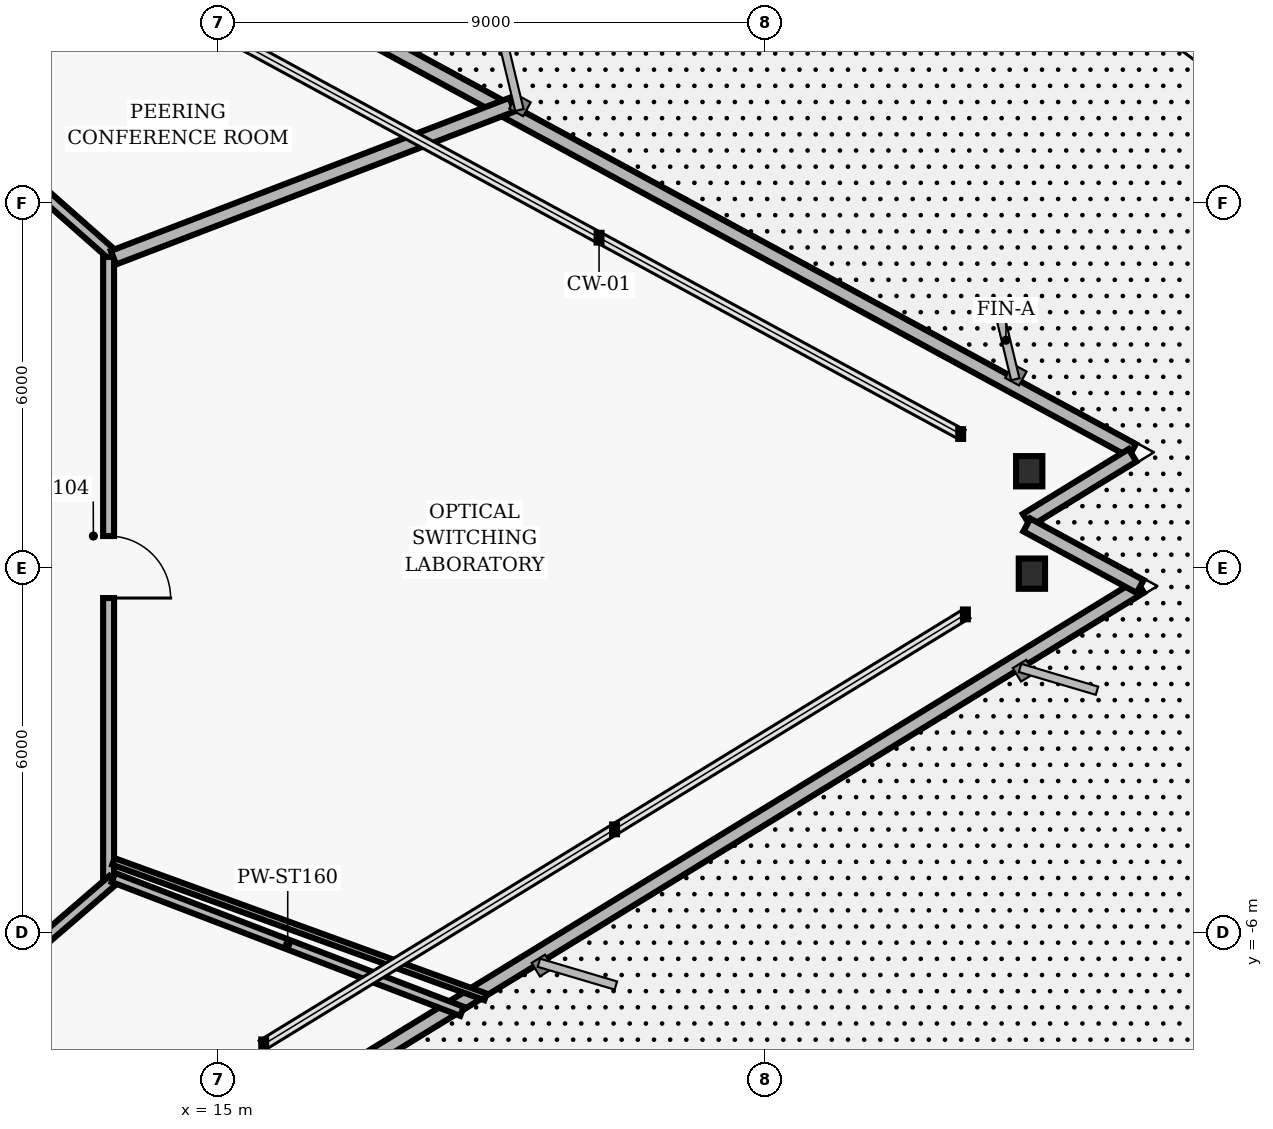
"""IFC4 building model, lengths in metres.
Left out: names, types, materials, properties, quantities, classifications, styles, units other than length and angle.
Written with IfcOpenShell. Run it as: python <this file> out.ifc"""

import sys

from ifc_helpers import new_model, si_unit, direction, frame, frame_2d, origin, origin_2d, place, context, subcontext, project, spatial, rectangle, i_section, extrude, element, fill, save


model = new_model("IFC4")
c1 = context("Model", 3, precision=1e-05, world=origin(), true_north=direction((0.0, 1.0)))
c2 = subcontext(c1, "Body", "Model", "MODEL_VIEW")
j1 = project(units=[si_unit("LENGTHUNIT", "METRE"), si_unit("PLANEANGLEUNIT", "RADIAN")], contexts=[c1])
p1 = place(None, origin())
s1 = spatial("IfcSite", under=j1, at=p1, CompositionType="ELEMENT")
p2 = place(p1, origin())
s2 = spatial("IfcBuilding", under=s1, at=p2, CompositionType="ELEMENT")
p3 = place(p2, frame((0.0, 0.0, 18.88)))
s3 = spatial("IfcBuildingStorey", under=s2, at=p3, CompositionType="ELEMENT", Elevation=18.88)
for number, where, z_axis, x_axis in (
    (1, (28.341, 1.585, 0.0), (0.0, 0.0, 1.0), (1.0, 0.0, 0.0)),
    (2, (28.385, -0.1, 0.0), (0.0, 0.0, 1.0), (1.0, 0.0, 0.0)),
):
    element("IfcColumn", number, at=place(p3, frame(where, z_axis=z_axis, x_axis=x_axis)), inside=s3, PredefinedType="COLUMN", context=c2, shape_type="SweptSolid", body=[
        extrude(i_section(OverallWidth=0.432, OverallDepth=0.498, WebThickness=0.056, FlangeThickness=0.089, FilletRadius=0.025, at=origin_2d()), origin(), (0.0, 0.0, 1.0), 3.36),
    ])
p4 = place(p3, frame((30.165, -0.311, 0.0), z_axis=(0.0, 0.0, 1.0), x_axis=(-0.852639202063, -0.522500135029, 0.0)))
e3 = element("IfcWall", 3, at=p4, inside=s3, PredefinedType="PARAPET", context=c2, shape_type="SweptSolid", body=[
    extrude(rectangle(XDim=51.035, YDim=0.24, at=frame_2d((25.518, 0.0))), origin(), (0.0, 0.0, 1.0), 1.65),
])
p5 = place(p3, frame((10.459, 12.557, 0.0), z_axis=(0.0, 0.0, 1.0), x_axis=(0.878817850286, -0.477157401722, 0.0)))
e4 = element("IfcWall", 4, at=p5, inside=s3, PredefinedType="PARAPET", context=c2, shape_type="SweptSolid", body=[
    extrude(rectangle(XDim=22.278, YDim=0.24, at=frame_2d((11.139, 0.0))), origin(), (0.0, 0.0, 1.0), 1.65),
])
p6 = place(p3, frame((30.039, 1.847, 0.0), z_axis=(0.0, 0.0, 1.0), x_axis=(-0.852651126253, -0.522480676101, 0.0)))
e5 = element("IfcWall", 5, at=p6, inside=s3, PredefinedType="PARAPET", context=c2, shape_type="SweptSolid", body=[
    extrude(rectangle(XDim=2.04, YDim=0.24, at=frame_2d((1.02, 0.0))), origin(), (0.0, 0.0, 1.0), 1.65),
])
p7 = place(p3, frame((28.302, 0.701, 0.0), z_axis=(0.0, 0.0, 1.0), x_axis=(0.878783062921, -0.477221466747, 0.0)))
e6 = element("IfcWall", 6, at=p7, inside=s3, PredefinedType="PARAPET", context=c2, shape_type="SweptSolid", body=[
    extrude(rectangle(XDim=2.12, YDim=0.24, at=frame_2d((1.06, 0.0))), origin(), (0.0, 0.0, 1.0), 1.65),
])
p8 = place(p3, frame((8.567, 9.29, 0.0), z_axis=(0.0, 0.0, 1.0), x_axis=(0.749626463267, -0.66186113768, 0.0)))
e7 = element("IfcWall", 7, at=p8, inside=s3, PredefinedType="PARTITIONING", context=c2, shape_type="SweptSolid", body=[
    extrude(rectangle(XDim=6.27, YDim=0.18, at=frame_2d((3.135, 0.0))), origin(), (0.0, 0.0, 1.0), 2.587),
])
p9 = place(p8, frame((2.895, 0.0, 0.0)))
e8 = element("IfcOpeningElement", 8, at=p9, cuts=e7, PredefinedType="OPENING", context=c2, shape_type="SweptSolid", body=[
    extrude(rectangle(XDim=0.96, YDim=2.02, at=frame_2d((0.48, 1.01))), frame((0.0, 0.1, 0.0), z_axis=(0.0, -1.0, 0.0), x_axis=(1.0, 0.0, 0.0)), (0.0, 0.0, 1.0), 0.2),
])
p10 = place(p3, frame((13.2, 5.11, 0.0), z_axis=(0.0, 0.0, 1.0), x_axis=(0.0, -1.0, 0.0)))
e9 = element("IfcWall", 9, at=p10, inside=s3, PredefinedType="PARTITIONING", context=c2, shape_type="SweptSolid", body=[
    extrude(rectangle(XDim=10.22, YDim=0.18, at=frame_2d((5.11, 0.0))), origin(), (0.0, 0.0, 1.0), 3.073),
])
p11 = place(p10, frame((4.591, 0.0, 0.0)))
e10 = element("IfcOpeningElement", 10, at=p11, cuts=e9, PredefinedType="OPENING", context=c2, shape_type="SweptSolid", body=[
    extrude(rectangle(XDim=1.02, YDim=2.02, at=frame_2d((0.51, 1.01))), frame((0.0, 0.1, 0.0), z_axis=(0.0, -1.0, 0.0), x_axis=(1.0, 0.0, 0.0)), (0.0, 0.0, 1.0), 0.2),
])
p12 = place(p3, frame((13.268, -5.141, 0.0), z_axis=(0.0, 0.0, 1.0), x_axis=(-0.757534501725, -0.65279512766, 0.0)))
e11 = element("IfcWall", 11, at=p12, inside=s3, PredefinedType="PARTITIONING", context=c2, shape_type="SweptSolid", body=[
    extrude(rectangle(XDim=6.385, YDim=0.18, at=frame_2d((3.192, 0.0))), origin(), (0.0, 0.0, 1.0), 2.587),
])
p13 = place(p3, frame((13.28, -5.098, 0.0), z_axis=(0.0, 0.0, 1.0), x_axis=(0.933574999212, -0.358382087787, 0.0)))
e12 = element("IfcWall", 12, at=p13, inside=s3, PredefinedType="PARTITIONING", context=c2, shape_type="SweptSolid", body=[
    extrude(rectangle(XDim=6.139, YDim=0.16, at=frame_2d((3.07, 0.0))), origin(), (0.0, 0.0, 1.0), 3.073),
])
p14 = place(p3, frame((13.28, -4.833, 0.0), z_axis=(0.0, 0.0, 1.0), x_axis=(0.939690475906, -0.342026036278, 0.0)))
e13 = element("IfcWall", 13, at=p14, inside=s3, PredefinedType="MOVABLE", context=c2, shape_type="SweptSolid", body=[
    extrude(rectangle(XDim=6.511, YDim=0.115, at=frame_2d((3.256, 0.0))), origin(), (0.0, 0.0, 1.0), 3.073),
])
p15 = place(p3, frame((13.28, 5.098, 0.0), z_axis=(0.0, 0.0, 1.0), x_axis=(0.933577510578, 0.358375545681, 0.0)))
e14 = element("IfcWall", 14, at=p15, inside=s3, PredefinedType="PARTITIONING", context=c2, shape_type="SweptSolid", body=[
    extrude(rectangle(XDim=7.021, YDim=0.24, at=frame_2d((3.511, 0.0))), origin(), (0.0, 0.0, 1.0), 3.073),
])
p16 = place(p11, origin())
e15 = element("IfcDoor", 15, at=p16, inside=s3, OperationType="SINGLE_SWING_RIGHT", PredefinedType="DOOR", context=c2, shape_type="SweptSolid", body=[
    extrude(rectangle(XDim=1.02, YDim=2.02, at=frame_2d((0.51, 1.01))), frame((0.0, 0.025, 0.0), z_axis=(0.0, -1.0, 0.0), x_axis=(1.0, 0.0, 0.0)), (0.0, 0.0, 1.0), 0.05),
])
fill(e10, e15)
save(model, sys.argv[1])
